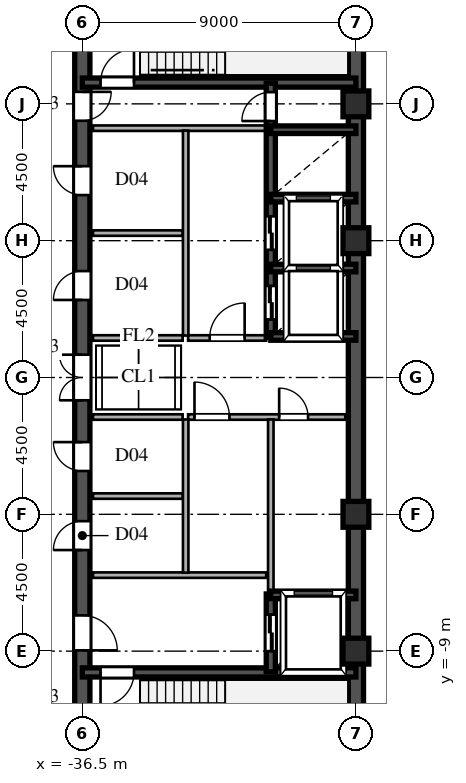
"""IFC4 building model, lengths in metres.
Left out: names, types, materials, properties, quantities, classifications, styles, units other than length and angle.
Written with IfcOpenShell. Run it as: python <this file> out.ifc"""

import sys

from ifc_helpers import new_model, si_unit, direction, frame, frame_2d, origin, origin_2d, place, context, subcontext, project, spatial, rectangle, hollow_rectangle, extrude, source, transform, mapped, element, fill, save


model = new_model("IFC4")
c1 = context("Model", 3, precision=1e-05, world=origin(), true_north=direction((0.0, 1.0)))
c2 = subcontext(c1, "Body", "Model", "MODEL_VIEW")
j1 = project(units=[si_unit("LENGTHUNIT", "METRE"), si_unit("PLANEANGLEUNIT", "RADIAN")], contexts=[c1])
p1 = place(None, origin())
s1 = spatial("IfcSite", under=j1, at=p1, CompositionType="ELEMENT")
p2 = place(p1, origin())
s2 = spatial("IfcBuilding", under=s1, at=p2, CompositionType="ELEMENT")
p3 = place(p2, frame((0.0, 0.0, 221.1)))
s3 = spatial("IfcBuildingStorey", under=s2, at=p3, CompositionType="ELEMENT", Elevation=221.1)
m1 = source(origin(), c2, "Body", "SweptSolid", [
    extrude(hollow_rectangle(XDim=0.85, YDim=0.85, WallThickness=0.036, at=origin_2d()), origin(), (0.0, 0.0, 1.0), 3.6),
])
for number, where, z_axis, x_axis in (
    (1, (-27.5, -9.0, 0.0), (0.0, 0.0, 1.0), (1.0, 0.0, 0.0)),
    (2, (-27.5, -4.5, 0.0), (0.0, 0.0, 1.0), (1.0, 0.0, 0.0)),
    (3, (-27.5, 4.5, 0.0), (0.0, 0.0, 1.0), (1.0, 0.0, 0.0)),
    (4, (-27.5, 9.0, 0.0), (0.0, 0.0, 1.0), (1.0, 0.0, 0.0)),
):
    element("IfcColumn", number, at=place(p3, frame(where, z_axis=z_axis, x_axis=x_axis)), inside=s3, PredefinedType="COLUMN", context=c2, shape_type="MappedRepresentation", body=[
        mapped(m1, transform((0.0, 0.0, 0.0), scale=1.0)),
    ])
for number, where, z_axis, x_axis in (
    (5, (-27.5, -13.5, 0.0), (0.0, 0.0, 1.0), (0.0, 1.0, 0.0)),
    (6, (-27.5, 1.3, 0.0), (0.0, 0.0, 1.0), (0.0, 1.0, 0.0)),
):
    element("IfcWall", number, at=place(p3, frame(where, z_axis=z_axis, x_axis=x_axis)), inside=s3, PredefinedType="SHEAR", context=c2, shape_type="SweptSolid", body=[
        extrude(rectangle(XDim=12.2, YDim=0.5, at=frame_2d((6.1, 0.0))), origin(), (0.0, 0.0, 1.0), 3.34),
    ])
p4 = place(p3, frame((-27.5, -1.3, 0.0), z_axis=(0.0, 0.0, 1.0), x_axis=(0.0, 1.0, 0.0)))
e7 = element("IfcWall", 7, at=p4, inside=s3, PredefinedType="SHEAR", context=c2, shape_type="SweptSolid", body=[
    extrude(rectangle(XDim=2.6, YDim=0.5, at=frame_2d((1.3, 0.0))), origin(), (0.0, 0.0, 1.0), 3.34),
])
p5 = place(p3, frame((-36.5, -13.65, 0.0), z_axis=(0.0, 0.0, 1.0), x_axis=(0.0, 1.0, 0.0)))
e8 = element("IfcWall", 8, at=p5, inside=s3, PredefinedType="SHEAR", context=c2, shape_type="SweptSolid", body=[
    extrude(rectangle(XDim=7.15, YDim=0.5, at=frame_2d((3.575, 0.0))), origin(), (0.0, 0.0, 1.0), 3.34),
])
p6 = place(p5, frame((4.675, 0.0, 0.0)))
e9 = element("IfcOpeningElement", 9, at=p6, cuts=e8, PredefinedType="OPENING", context=c2, shape_type="SweptSolid", body=[
    extrude(rectangle(XDim=1.15, YDim=2.2, at=frame_2d((0.575, 1.1))), frame((0.0, 0.26, 0.0), z_axis=(0.0, -1.0, 0.0), x_axis=(1.0, 0.0, 0.0)), (0.0, 0.0, 1.0), 0.52),
])
p7 = place(p3, frame((-36.5, -1.3, 0.0), z_axis=(0.0, 0.0, 1.0), x_axis=(0.0, 1.0, 0.0)))
e10 = element("IfcWall", 10, at=p7, inside=s3, PredefinedType="SHEAR", context=c2, shape_type="SweptSolid", body=[
    extrude(rectangle(XDim=2.6, YDim=0.5, at=frame_2d((1.3, 0.0))), origin(), (0.0, 0.0, 1.0), 3.34),
])
p8 = place(p7, frame((0.55, 0.0, 0.0)))
e11 = element("IfcOpeningElement", 11, at=p8, cuts=e10, PredefinedType="OPENING", context=c2, shape_type="SweptSolid", body=[
    extrude(rectangle(XDim=1.5, YDim=2.3, at=frame_2d((0.75, 1.15))), frame((0.0, 0.26, 0.0), z_axis=(0.0, -1.0, 0.0), x_axis=(1.0, 0.0, 0.0)), (0.0, 0.0, 1.0), 0.52),
])
p9 = place(p3, frame((-36.5, 8.2, 0.0), z_axis=(0.0, 0.0, 1.0), x_axis=(0.0, 1.0, 0.0)))
e12 = element("IfcWall", 12, at=p9, inside=s3, PredefinedType="SHEAR", context=c2, shape_type="SweptSolid", body=[
    extrude(rectangle(XDim=5.45, YDim=0.5, at=frame_2d((2.725, 0.0))), origin(), (0.0, 0.0, 1.0), 3.34),
])
p10 = place(p9, frame((0.245, 0.0, 0.0)))
e13 = element("IfcOpeningElement", 13, at=p10, cuts=e12, PredefinedType="OPENING", context=c2, shape_type="SweptSolid", body=[
    extrude(rectangle(XDim=0.95, YDim=2.15, at=frame_2d((0.475, 1.075))), frame((0.0, 0.26, 0.0), z_axis=(0.0, -1.0, 0.0), x_axis=(1.0, 0.0, 0.0)), (0.0, 0.0, 1.0), 0.52),
])
p11 = place(p3, frame((-36.5, -6.5, 0.0), z_axis=(0.0, 0.0, 1.0), x_axis=(0.0, 1.0, 0.0)))
e14 = element("IfcWall", 14, at=p11, inside=s3, PredefinedType="SHEAR", context=c2, shape_type="SweptSolid", body=[
    extrude(rectangle(XDim=2.6, YDim=0.5, at=frame_2d((1.3, 0.0))), origin(), (0.0, 0.0, 1.0), 3.34),
])
p12 = place(p11, frame((0.825, 0.0, 0.0)))
e15 = element("IfcOpeningElement", 15, at=p12, cuts=e14, PredefinedType="OPENING", context=c2, shape_type="SweptSolid", body=[
    extrude(rectangle(XDim=0.95, YDim=2.15, at=frame_2d((0.475, 1.075))), frame((0.0, 0.26, 0.0), z_axis=(0.0, -1.0, 0.0), x_axis=(1.0, 0.0, 0.0)), (0.0, 0.0, 1.0), 0.52),
])
p13 = place(p3, frame((-36.5, -3.9, 0.0), z_axis=(0.0, 0.0, 1.0), x_axis=(0.0, 1.0, 0.0)))
e16 = element("IfcWall", 16, at=p13, inside=s3, PredefinedType="SHEAR", context=c2, shape_type="SweptSolid", body=[
    extrude(rectangle(XDim=2.6, YDim=0.5, at=frame_2d((1.3, 0.0))), origin(), (0.0, 0.0, 1.0), 3.34),
])
p14 = place(p13, frame((0.825, 0.0, 0.0)))
e17 = element("IfcOpeningElement", 17, at=p14, cuts=e16, PredefinedType="OPENING", context=c2, shape_type="SweptSolid", body=[
    extrude(rectangle(XDim=0.95, YDim=2.15, at=frame_2d((0.475, 1.075))), frame((0.0, 0.26, 0.0), z_axis=(0.0, -1.0, 0.0), x_axis=(1.0, 0.0, 0.0)), (0.0, 0.0, 1.0), 0.52),
])
p15 = place(p3, frame((-36.5, 1.3, 0.0), z_axis=(0.0, 0.0, 1.0), x_axis=(0.0, 1.0, 0.0)))
e18 = element("IfcWall", 18, at=p15, inside=s3, PredefinedType="SHEAR", context=c2, shape_type="SweptSolid", body=[
    extrude(rectangle(XDim=3.45, YDim=0.5, at=frame_2d((1.725, 0.0))), origin(), (0.0, 0.0, 1.0), 3.34),
])
p16 = place(p15, frame((1.25, 0.0, 0.0)))
e19 = element("IfcOpeningElement", 19, at=p16, cuts=e18, PredefinedType="OPENING", context=c2, shape_type="SweptSolid", body=[
    extrude(rectangle(XDim=0.95, YDim=2.15, at=frame_2d((0.475, 1.075))), frame((0.0, 0.26, 0.0), z_axis=(0.0, -1.0, 0.0), x_axis=(1.0, 0.0, 0.0)), (0.0, 0.0, 1.0), 0.52),
])
p17 = place(p3, frame((-36.5, 4.75, 0.0), z_axis=(0.0, 0.0, 1.0), x_axis=(0.0, 1.0, 0.0)))
e20 = element("IfcWall", 20, at=p17, inside=s3, PredefinedType="SHEAR", context=c2, shape_type="SweptSolid", body=[
    extrude(rectangle(XDim=3.45, YDim=0.5, at=frame_2d((1.725, 0.0))), origin(), (0.0, 0.0, 1.0), 3.34),
])
p18 = place(p17, frame((1.25, 0.0, 0.0)))
e21 = element("IfcOpeningElement", 21, at=p18, cuts=e20, PredefinedType="OPENING", context=c2, shape_type="SweptSolid", body=[
    extrude(rectangle(XDim=0.95, YDim=2.15, at=frame_2d((0.475, 1.075))), frame((0.0, 0.26, 0.0), z_axis=(0.0, -1.0, 0.0), x_axis=(1.0, 0.0, 0.0)), (0.0, 0.0, 1.0), 0.52),
])
p19 = place(p3, frame((-36.5, -9.7, 0.0), z_axis=(0.0, 0.0, 1.0), x_axis=(1.0, 0.0, 0.0)))
e22 = element("IfcWall", 22, at=p19, inside=s3, PredefinedType="SHEAR", context=c2, shape_type="SweptSolid", body=[
    extrude(rectangle(XDim=9.0, YDim=0.3, at=frame_2d((4.5, 0.0))), origin(), (0.0, 0.0, 1.0), 3.34),
])
p20 = place(p19, frame((0.6, 0.0, 0.0)))
e23 = element("IfcOpeningElement", 23, at=p20, cuts=e22, PredefinedType="OPENING", context=c2, shape_type="SweptSolid", body=[
    extrude(rectangle(XDim=1.1, YDim=2.2, at=frame_2d((0.55, 1.1))), frame((0.0, 0.16, 0.0), z_axis=(0.0, -1.0, 0.0), x_axis=(1.0, 0.0, 0.0)), (0.0, 0.0, 1.0), 0.32),
])
p21 = place(p3, frame((-36.5, 9.7, 0.0), z_axis=(0.0, 0.0, 1.0), x_axis=(1.0, 0.0, 0.0)))
e24 = element("IfcWall", 24, at=p21, inside=s3, PredefinedType="SHEAR", context=c2, shape_type="SweptSolid", body=[
    extrude(rectangle(XDim=9.0, YDim=0.3, at=frame_2d((4.5, 0.0))), origin(), (0.0, 0.0, 1.0), 3.34),
])
p22 = place(p21, frame((0.6, 0.0, 0.0)))
e25 = element("IfcOpeningElement", 25, at=p22, cuts=e24, PredefinedType="OPENING", context=c2, shape_type="SweptSolid", body=[
    extrude(rectangle(XDim=1.1, YDim=2.2, at=frame_2d((0.55, 1.1))), frame((0.0, 0.16, 0.0), z_axis=(0.0, -1.0, 0.0), x_axis=(1.0, 0.0, 0.0)), (0.0, 0.0, 1.0), 0.32),
])
for number, where, z_axis, x_axis in (
    (26, (-30.3, -7.15, 0.0), (0.0, 0.0, 1.0), (1.0, 0.0, 0.0)),
    (27, (-30.3, 1.35, 0.0), (0.0, 0.0, 1.0), (1.0, 0.0, 0.0)),
    (28, (-30.3, 3.6, 0.0), (0.0, 0.0, 1.0), (1.0, 0.0, 0.0)),
    (29, (-30.3, 5.9, 0.0), (0.0, 0.0, 1.0), (1.0, 0.0, 0.0)),
    (30, (-30.3, 8.15, 0.0), (0.0, 0.0, 1.0), (1.0, 0.0, 0.0)),
):
    element("IfcWall", number, at=place(p3, frame(where, z_axis=z_axis, x_axis=x_axis)), inside=s3, PredefinedType="SHEAR", context=c2, shape_type="SweptSolid", body=[
        extrude(rectangle(XDim=2.8, YDim=0.25, at=frame_2d((1.4, 0.0))), origin(), (0.0, 0.0, 1.0), 3.34),
    ])
p23 = place(p3, frame((-30.3, -9.68, 0.0), z_axis=(0.0, 0.0, 1.0), x_axis=(0.0, 1.0, 0.0)))
e31 = element("IfcWall", 31, at=p23, inside=s3, PredefinedType="SHEAR", context=c2, shape_type="SweptSolid", body=[
    extrude(rectangle(XDim=2.56, YDim=0.3, at=frame_2d((1.28, 0.0))), origin(), (0.0, 0.0, 1.0), 3.34),
])
p24 = place(p23, frame((0.68, 0.0, 0.0)))
e32 = element("IfcOpeningElement", 32, at=p24, cuts=e31, PredefinedType="OPENING", context=c2, shape_type="SweptSolid", body=[
    extrude(rectangle(XDim=1.2, YDim=2.25, at=frame_2d((0.6, 1.125))), frame((0.0, 0.16, 0.0), z_axis=(0.0, -1.0, 0.0), x_axis=(1.0, 0.0, 0.0)), (0.0, 0.0, 1.0), 0.32),
])
p25 = place(p3, frame((-30.3, 1.32, 0.0), z_axis=(0.0, 0.0, 1.0), x_axis=(0.0, 1.0, 0.0)))
e33 = element("IfcWall", 33, at=p25, inside=s3, PredefinedType="SHEAR", context=c2, shape_type="SweptSolid", body=[
    extrude(rectangle(XDim=2.28, YDim=0.3, at=frame_2d((1.14, 0.0))), origin(), (0.0, 0.0, 1.0), 3.34),
])
p26 = place(p25, frame((0.59, 0.0, 0.0)))
e34 = element("IfcOpeningElement", 34, at=p26, cuts=e33, PredefinedType="OPENING", context=c2, shape_type="SweptSolid", body=[
    extrude(rectangle(XDim=1.1, YDim=2.2, at=frame_2d((0.55, 1.1))), frame((0.0, 0.16, 0.0), z_axis=(0.0, -1.0, 0.0), x_axis=(1.0, 0.0, 0.0)), (0.0, 0.0, 1.0), 0.32),
])
p27 = place(p3, frame((-30.3, 3.6, 0.0), z_axis=(0.0, 0.0, 1.0), x_axis=(0.0, 1.0, 0.0)))
e35 = element("IfcWall", 35, at=p27, inside=s3, PredefinedType="SHEAR", context=c2, shape_type="SweptSolid", body=[
    extrude(rectangle(XDim=2.3, YDim=0.3, at=frame_2d((1.15, 0.0))), origin(), (0.0, 0.0, 1.0), 3.34),
])
p28 = place(p27, frame((0.6, 0.0, 0.0)))
e36 = element("IfcOpeningElement", 36, at=p28, cuts=e35, PredefinedType="OPENING", context=c2, shape_type="SweptSolid", body=[
    extrude(rectangle(XDim=1.1, YDim=2.2, at=frame_2d((0.55, 1.1))), frame((0.0, 0.16, 0.0), z_axis=(0.0, -1.0, 0.0), x_axis=(1.0, 0.0, 0.0)), (0.0, 0.0, 1.0), 0.32),
])
p29 = place(p3, frame((-30.3, 5.9, 0.0), z_axis=(0.0, 0.0, 1.0), x_axis=(0.0, 1.0, 0.0)))
e37 = element("IfcWall", 37, at=p29, inside=s3, PredefinedType="SHEAR", context=c2, shape_type="SweptSolid", body=[
    extrude(rectangle(XDim=2.25, YDim=0.3, at=frame_2d((1.125, 0.0))), origin(), (0.0, 0.0, 1.0), 3.34),
])
p30 = place(p3, frame((-30.3, 8.15, 0.0), z_axis=(0.0, 0.0, 1.0), x_axis=(0.0, 1.0, 0.0)))
e38 = element("IfcWall", 38, at=p30, inside=s3, PredefinedType="SHEAR", context=c2, shape_type="SweptSolid", body=[
    extrude(rectangle(XDim=1.53, YDim=0.3, at=frame_2d((0.765, 0.0))), origin(), (0.0, 0.0, 1.0), 3.34),
])
p31 = place(p30, frame((0.285, 0.0, 0.0)))
e39 = element("IfcOpeningElement", 39, at=p31, cuts=e38, PredefinedType="OPENING", context=c2, shape_type="SweptSolid", body=[
    extrude(rectangle(XDim=0.95, YDim=2.15, at=frame_2d((0.475, 1.075))), frame((0.0, 0.16, 0.0), z_axis=(0.0, -1.0, 0.0), x_axis=(1.0, 0.0, 0.0)), (0.0, 0.0, 1.0), 0.32),
])
for number, where, z_axis, x_axis in (
    (40, (-36.15, -6.5, 0.0), (0.0, 0.0, 1.0), (1.0, 0.0, 0.0)),
    (41, (-36.15, 8.2, 0.0), (0.0, 0.0, 1.0), (1.0, 0.0, 0.0)),
):
    element("IfcWall", number, at=place(p3, frame(where, z_axis=z_axis, x_axis=x_axis)), inside=s3, PredefinedType="PARTITIONING", context=c2, shape_type="SweptSolid", body=[
        extrude(rectangle(XDim=5.7, YDim=0.18, at=frame_2d((2.85, 0.0))), origin(), (0.0, 0.0, 1.0), 3.34),
    ])
p32 = place(p3, frame((-33.1, -6.42, 0.0), z_axis=(0.0, 0.0, 1.0), x_axis=(0.0, 1.0, 0.0)))
e42 = element("IfcWall", 42, at=p32, inside=s3, PredefinedType="PARTITIONING", context=c2, shape_type="SweptSolid", body=[
    extrude(rectangle(XDim=5.04, YDim=0.18, at=frame_2d((2.52, 0.0))), origin(), (0.0, 0.0, 1.0), 3.34),
])
p33 = place(p3, frame((-33.1, 1.38, 0.0), z_axis=(0.0, 0.0, 1.0), x_axis=(0.0, 1.0, 0.0)))
e43 = element("IfcWall", 43, at=p33, inside=s3, PredefinedType="PARTITIONING", context=c2, shape_type="SweptSolid", body=[
    extrude(rectangle(XDim=6.74, YDim=0.18, at=frame_2d((3.37, 0.0))), origin(), (0.0, 0.0, 1.0), 3.34),
])
p34 = place(p3, frame((-30.3, -1.3, 0.0), z_axis=(0.0, 0.0, 1.0), x_axis=(1.0, 0.0, 0.0)))
e44 = element("IfcWall", 44, at=p34, inside=s3, PredefinedType="PARTITIONING", context=c2, shape_type="SweptSolid", body=[
    extrude(rectangle(XDim=2.45, YDim=0.18, at=frame_2d((1.225, 0.0))), origin(), (0.0, 0.0, 1.0), 3.34),
])
p35 = place(p34, frame((0.275, 0.0, 0.0)))
e45 = element("IfcOpeningElement", 45, at=p35, cuts=e44, PredefinedType="OPENING", context=c2, shape_type="SweptSolid", body=[
    extrude(rectangle(XDim=0.95, YDim=2.15, at=frame_2d((0.475, 1.075))), frame((0.0, 0.1, 0.0), z_axis=(0.0, -1.0, 0.0), x_axis=(1.0, 0.0, 0.0)), (0.0, 0.0, 1.0), 0.2),
])
p36 = place(p3, frame((-33.02, -1.3, 0.0), z_axis=(0.0, 0.0, 1.0), x_axis=(1.0, 0.0, 0.0)))
e46 = element("IfcWall", 46, at=p36, inside=s3, PredefinedType="PARTITIONING", context=c2, shape_type="SweptSolid", body=[
    extrude(rectangle(XDim=2.72, YDim=0.18, at=frame_2d((1.36, 0.0))), origin(), (0.0, 0.0, 1.0), 3.34),
])
p37 = place(p36, frame((0.21, 0.0, 0.0)))
e47 = element("IfcOpeningElement", 47, at=p37, cuts=e46, PredefinedType="OPENING", context=c2, shape_type="SweptSolid", body=[
    extrude(rectangle(XDim=1.15, YDim=2.2, at=frame_2d((0.575, 1.1))), frame((0.0, 0.1, 0.0), z_axis=(0.0, -1.0, 0.0), x_axis=(1.0, 0.0, 0.0)), (0.0, 0.0, 1.0), 0.2),
])
p38 = place(p3, frame((-30.3, -7.12, 0.0), z_axis=(0.0, 0.0, 1.0), x_axis=(0.0, 1.0, 0.0)))
e48 = element("IfcWall", 48, at=p38, inside=s3, PredefinedType="PARTITIONING", context=c2, shape_type="SweptSolid", body=[
    extrude(rectangle(XDim=5.74, YDim=0.18, at=frame_2d((2.87, 0.0))), origin(), (0.0, 0.0, 1.0), 3.34),
])
p39 = place(p3, frame((-33.02, 1.3, 0.0), z_axis=(0.0, 0.0, 1.0), x_axis=(1.0, 0.0, 0.0)))
e49 = element("IfcWall", 49, at=p39, inside=s3, PredefinedType="PARTITIONING", context=c2, shape_type="SweptSolid", body=[
    extrude(rectangle(XDim=2.57, YDim=0.18, at=frame_2d((1.285, 0.0))), origin(), (0.0, 0.0, 1.0), 3.34),
])
p40 = place(p39, frame((0.71, 0.0, 0.0)))
e50 = element("IfcOpeningElement", 50, at=p40, cuts=e49, PredefinedType="OPENING", context=c2, shape_type="SweptSolid", body=[
    extrude(rectangle(XDim=1.15, YDim=2.2, at=frame_2d((0.575, 1.1))), frame((0.0, 0.1, 0.0), z_axis=(0.0, -1.0, 0.0), x_axis=(1.0, 0.0, 0.0)), (0.0, 0.0, 1.0), 0.2),
])
for number, where, z_axis, x_axis in (
    (51, (-36.15, -1.3, 0.0), (0.0, 0.0, 1.0), (1.0, 0.0, 0.0)),
    (52, (-36.15, 1.3, 0.0), (0.0, 0.0, 1.0), (1.0, 0.0, 0.0)),
    (53, (-36.15, -3.9, 0.0), (0.0, 0.0, 1.0), (1.0, 0.0, 0.0)),
    (54, (-36.15, 4.75, 0.0), (0.0, 0.0, 1.0), (1.0, 0.0, 0.0)),
):
    element("IfcWall", number, at=place(p3, frame(where, z_axis=z_axis, x_axis=x_axis)), inside=s3, PredefinedType="PARTITIONING", context=c2, shape_type="SweptSolid", body=[
        extrude(rectangle(XDim=2.95, YDim=0.18, at=frame_2d((1.475, 0.0))), origin(), (0.0, 0.0, 1.0), 3.34),
    ])
m2 = source(origin(), c2, "Body", "SweptSolid", [
    extrude(rectangle(XDim=1.15, YDim=2.2, at=frame_2d((0.575, 1.1))), frame((0.0, 0.025, 0.0), z_axis=(0.0, -1.0, 0.0), x_axis=(1.0, 0.0, 0.0)), (0.0, 0.0, 1.0), 0.05),
])
p41 = place(p6, frame((1.15, 0.0, 0.0), z_axis=(0.0, 0.0, 1.0), x_axis=(-1.0, 0.0, 0.0)))
e55 = element("IfcDoor", 55, at=p41, inside=s3, OperationType="SINGLE_SWING_LEFT", PredefinedType="DOOR", context=c2, shape_type="MappedRepresentation", body=[
    mapped(m2, transform((0.0, 0.0, 0.0), scale=1.0)),
])
fill(e9, e55)
m3 = source(origin(), c2, "Body", "SweptSolid", [
    extrude(rectangle(XDim=1.5, YDim=2.3, at=frame_2d((0.75, 1.15))), frame((0.0, 0.025, 0.0), z_axis=(0.0, -1.0, 0.0), x_axis=(1.0, 0.0, 0.0)), (0.0, 0.0, 1.0), 0.05),
])
p42 = place(p8, origin())
e56 = element("IfcDoor", 56, at=p42, inside=s3, OperationType="DOUBLE_SWING_LEFT", PredefinedType="DOOR", context=c2, shape_type="MappedRepresentation", body=[
    mapped(m3, transform((0.0, 0.0, 0.0), scale=1.0)),
])
fill(e11, e56)
m4 = source(origin(), c2, "Body", "SweptSolid", [
    extrude(rectangle(XDim=0.95, YDim=2.15, at=frame_2d((0.475, 1.075))), frame((0.0, 0.025, 0.0), z_axis=(0.0, -1.0, 0.0), x_axis=(1.0, 0.0, 0.0)), (0.0, 0.0, 1.0), 0.05),
])
p43 = place(p10, frame((0.95, 0.0, 0.0), z_axis=(0.0, 0.0, 1.0), x_axis=(-1.0, 0.0, 0.0)))
e57 = element("IfcDoor", 57, at=p43, inside=s3, OperationType="SINGLE_SWING_RIGHT", PredefinedType="DOOR", context=c2, shape_type="MappedRepresentation", body=[
    mapped(m4, transform((0.0, 0.0, 0.0), scale=1.0)),
])
fill(e13, e57)
p44 = place(p12, origin())
e58 = element("IfcDoor", 58, at=p44, inside=s3, OperationType="SINGLE_SWING_LEFT", PredefinedType="DOOR", context=c2, shape_type="MappedRepresentation", body=[
    mapped(m4, transform((0.0, 0.0, 0.0), scale=1.0)),
])
fill(e15, e58)
p45 = place(p14, origin())
e59 = element("IfcDoor", 59, at=p45, inside=s3, OperationType="SINGLE_SWING_RIGHT", PredefinedType="DOOR", context=c2, shape_type="MappedRepresentation", body=[
    mapped(m4, transform((0.0, 0.0, 0.0), scale=1.0)),
])
fill(e17, e59)
p46 = place(p16, origin())
e60 = element("IfcDoor", 60, at=p46, inside=s3, OperationType="SINGLE_SWING_LEFT", PredefinedType="DOOR", context=c2, shape_type="MappedRepresentation", body=[
    mapped(m4, transform((0.0, 0.0, 0.0), scale=1.0)),
])
fill(e19, e60)
p47 = place(p18, origin())
e61 = element("IfcDoor", 61, at=p47, inside=s3, OperationType="SINGLE_SWING_RIGHT", PredefinedType="DOOR", context=c2, shape_type="MappedRepresentation", body=[
    mapped(m4, transform((0.0, 0.0, 0.0), scale=1.0)),
])
fill(e21, e61)
m5 = source(origin(), c2, "Body", "SweptSolid", [
    extrude(rectangle(XDim=1.1, YDim=2.2, at=frame_2d((0.55, 1.1))), frame((0.0, 0.025, 0.0), z_axis=(0.0, -1.0, 0.0), x_axis=(1.0, 0.0, 0.0)), (0.0, 0.0, 1.0), 0.05),
])
p48 = place(p20, frame((1.1, 0.0, 0.0), z_axis=(0.0, 0.0, 1.0), x_axis=(-1.0, 0.0, 0.0)))
e62 = element("IfcDoor", 62, at=p48, inside=s3, OperationType="SINGLE_SWING_LEFT", PredefinedType="DOOR", context=c2, shape_type="MappedRepresentation", body=[
    mapped(m5, transform((0.0, 0.0, 0.0), scale=1.0)),
])
fill(e23, e62)
p49 = place(p22, origin())
e63 = element("IfcDoor", 63, at=p49, inside=s3, OperationType="SINGLE_SWING_RIGHT", PredefinedType="DOOR", context=c2, shape_type="MappedRepresentation", body=[
    mapped(m5, transform((0.0, 0.0, 0.0), scale=1.0)),
])
fill(e25, e63)
m6 = source(origin(), c2, "Body", "SweptSolid", [
    extrude(rectangle(XDim=1.2, YDim=2.25, at=frame_2d((0.6, 1.125))), frame((0.0, 0.025, 0.0), z_axis=(0.0, -1.0, 0.0), x_axis=(1.0, 0.0, 0.0)), (0.0, 0.0, 1.0), 0.05),
])
p50 = place(p24, origin())
e64 = element("IfcDoor", 64, at=p50, inside=s3, OperationType="DOUBLE_DOOR_SLIDING", PredefinedType="DOOR", context=c2, shape_type="MappedRepresentation", body=[
    mapped(m6, transform((0.0, 0.0, 0.0), scale=1.0)),
])
fill(e32, e64)
m7 = source(origin(), c2, "Body", "SweptSolid", [
    extrude(rectangle(XDim=1.1, YDim=2.2, at=frame_2d((0.55, 1.1))), frame((0.0, 0.025, 0.0), z_axis=(0.0, -1.0, 0.0), x_axis=(1.0, 0.0, 0.0)), (0.0, 0.0, 1.0), 0.05),
])
p51 = place(p26, origin())
e65 = element("IfcDoor", 65, at=p51, inside=s3, OperationType="DOUBLE_DOOR_SLIDING", PredefinedType="DOOR", context=c2, shape_type="MappedRepresentation", body=[
    mapped(m7, transform((0.0, 0.0, 0.0), scale=1.0)),
])
fill(e34, e65)
p52 = place(p28, origin())
e66 = element("IfcDoor", 66, at=p52, inside=s3, OperationType="DOUBLE_DOOR_SLIDING", PredefinedType="DOOR", context=c2, shape_type="MappedRepresentation", body=[
    mapped(m7, transform((0.0, 0.0, 0.0), scale=1.0)),
])
fill(e36, e66)
p53 = place(p31, origin())
e67 = element("IfcDoor", 67, at=p53, inside=s3, OperationType="SINGLE_SWING_LEFT", PredefinedType="DOOR", context=c2, shape_type="MappedRepresentation", body=[
    mapped(m4, transform((0.0, 0.0, 0.0), scale=1.0)),
])
fill(e39, e67)
p54 = place(p35, origin())
e68 = element("IfcDoor", 68, at=p54, inside=s3, OperationType="SINGLE_SWING_LEFT", PredefinedType="DOOR", context=c2, shape_type="MappedRepresentation", body=[
    mapped(m4, transform((0.0, 0.0, 0.0), scale=1.0)),
])
fill(e45, e68)
p55 = place(p37, origin())
e69 = element("IfcDoor", 69, at=p55, inside=s3, OperationType="SINGLE_SWING_LEFT", PredefinedType="DOOR", context=c2, shape_type="MappedRepresentation", body=[
    mapped(m2, transform((0.0, 0.0, 0.0), scale=1.0)),
])
fill(e47, e69)
p56 = place(p40, origin())
e70 = element("IfcDoor", 70, at=p56, inside=s3, OperationType="SINGLE_SWING_RIGHT", PredefinedType="DOOR", context=c2, shape_type="MappedRepresentation", body=[
    mapped(m2, transform((0.0, 0.0, 0.0), scale=1.0)),
])
fill(e50, e70)
save(model, sys.argv[1])
